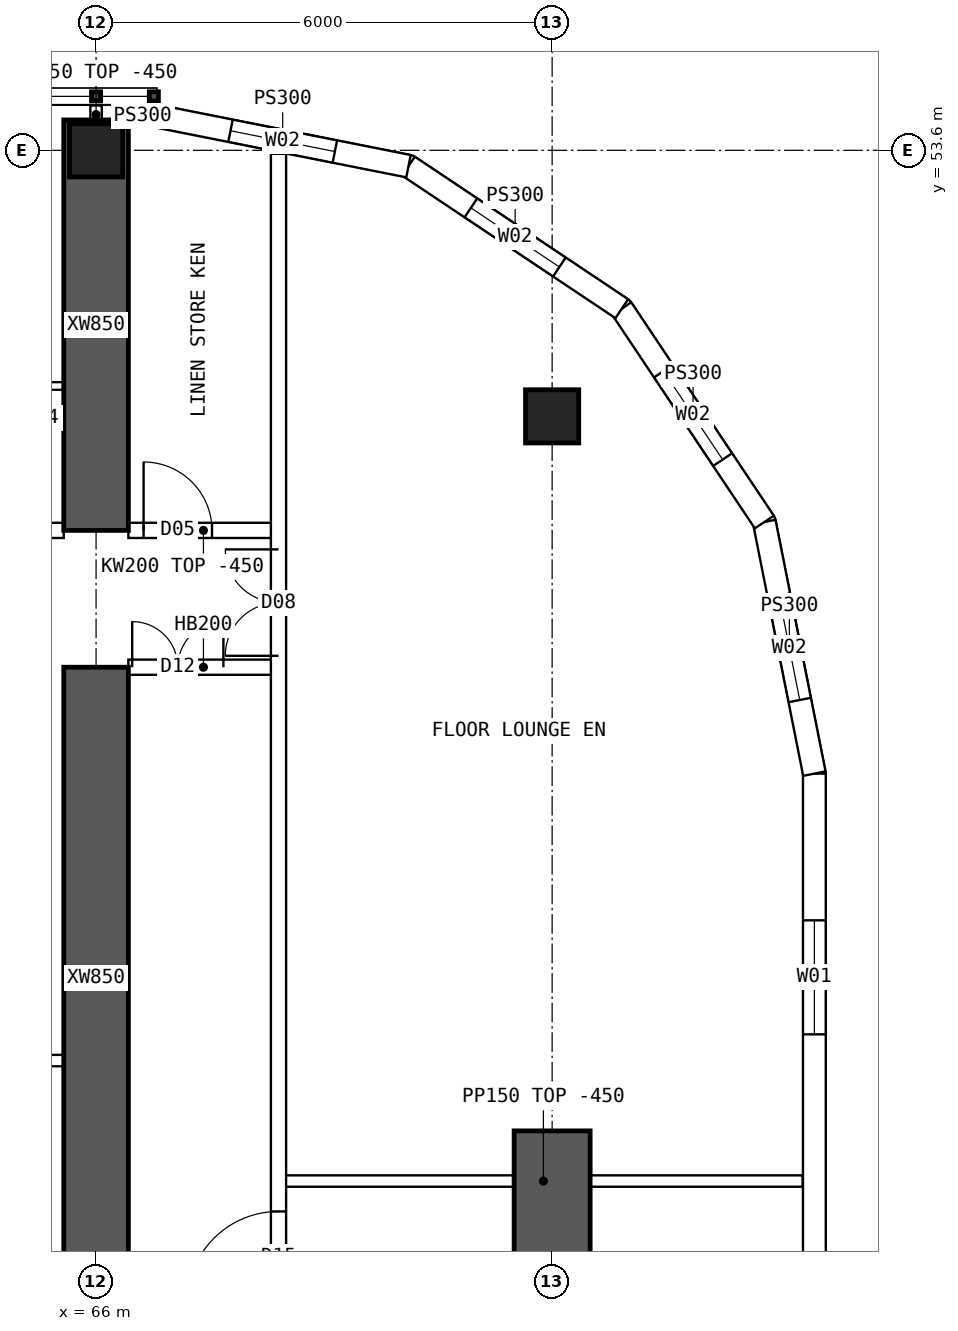
"""IFC4 building model, lengths in metres.
Left out: names, types, materials, properties, quantities, classifications, styles, units other than length and angle.
Written with IfcOpenShell. Run it as: python <this file> out.ifc"""

import sys

from ifc_helpers import new_model, si_unit, direction, frame, frame_2d, origin, origin_2d, place, context, subcontext, project, spatial, polyline, rectangle, hollow_rectangle, outline, extrude, element, fill, save


model = new_model("IFC4")
c1 = context("Model", 3, precision=1e-05, world=origin(), true_north=direction((0.0, 1.0)))
c2 = subcontext(c1, "Body", "Model", "MODEL_VIEW")
j1 = project(units=[si_unit("LENGTHUNIT", "METRE"), si_unit("PLANEANGLEUNIT", "RADIAN")], contexts=[c1])
p1 = place(None, origin())
s1 = spatial("IfcSite", under=j1, at=p1, CompositionType="ELEMENT")
p2 = place(p1, origin())
s2 = spatial("IfcBuilding", under=s1, at=p2, CompositionType="ELEMENT")
p3 = place(p2, frame((0.0, 0.0, 189.85)))
s3 = spatial("IfcBuildingStorey", under=s2, at=p3, CompositionType="ELEMENT", Elevation=189.85)
for number, where, z_axis, x_axis in (
    (1, (66.0, 53.6, 0.0), (0.0, 0.0, 1.0), (1.0, 0.0, 0.0)),
    (2, (72.0, 50.1, 0.0), (0.0, 0.0, 1.0), (1.0, 0.0, 0.0)),
):
    element("IfcColumn", number, at=place(p3, frame(where, z_axis=z_axis, x_axis=x_axis)), inside=s3, PredefinedType="COLUMN", context=c2, shape_type="SweptSolid", body=[
        extrude(hollow_rectangle(XDim=0.7, YDim=0.7, WallThickness=0.07, at=origin_2d()), origin(), (0.0, 0.0, 1.0), 3.75),
    ])
p4 = place(p3, frame((72.0, 35.7, 0.0), z_axis=(0.0, 0.0, 1.0), x_axis=(0.0, 1.0, 0.0)))
e3 = element("IfcWall", 3, at=p4, inside=s3, PredefinedType="SHEAR", context=c2, shape_type="SweptSolid", body=[
    extrude(rectangle(XDim=5.0, YDim=1.0, at=frame_2d((2.5, 0.0))), origin(), (0.0, 0.0, 1.0), 3.75),
])
p5 = place(p3, frame((66.0, 48.6, 0.0), z_axis=(0.0, 0.0, 1.0), x_axis=(0.0, 1.0, 0.0)))
e4 = element("IfcWall", 4, at=p5, inside=s3, PredefinedType="SHEAR", context=c2, shape_type="SweptSolid", body=[
    extrude(rectangle(XDim=5.4, YDim=0.85, at=frame_2d((2.7, 0.0))), origin(), (0.0, 0.0, 1.0), 3.75),
])
p6 = place(p3, frame((66.0, 38.625, 0.0), z_axis=(0.0, 0.0, 1.0), x_axis=(0.0, 1.0, 0.0)))
e5 = element("IfcWall", 5, at=p6, inside=s3, PredefinedType="SHEAR", context=c2, shape_type="SweptSolid", body=[
    extrude(rectangle(XDim=8.175, YDim=0.85, at=frame_2d((4.087, 0.0))), origin(), (0.0, 0.0, 1.0), 3.75),
])
p7 = place(p3, frame((75.45, 18.6, 0.0), z_axis=(0.0, 0.0, 1.0), x_axis=(0.0, 1.0, 0.0)))
e6 = element("IfcWall", 6, at=p7, inside=s3, PredefinedType="SOLIDWALL", context=c2, shape_type="SweptSolid", body=[
    extrude(outline(polyline([(-0.015, -0.15), (26.815, -0.15), (26.785, 0.15), (0.015, 0.15), (-0.015, -0.15)])), origin(), (0.0, 0.0, 1.0), 3.3),
])
p8 = place(p7, frame((1.93, 0.0, 0.9)))
e7 = element("IfcOpeningElement", 7, at=p8, cuts=e6, PredefinedType="OPENING", context=c2, shape_type="SweptSolid", body=[
    extrude(rectangle(XDim=1.5, YDim=2.0, at=frame_2d((0.75, 1.0))), frame((0.0, 0.16, 0.0), z_axis=(0.0, -1.0, 0.0), x_axis=(1.0, 0.0, 0.0)), (0.0, 0.0, 1.0), 0.32),
])
p9 = place(p7, frame((7.29, 0.0, 0.9)))
e8 = element("IfcOpeningElement", 8, at=p9, cuts=e6, PredefinedType="OPENING", context=c2, shape_type="SweptSolid", body=[
    extrude(rectangle(XDim=1.5, YDim=2.0, at=frame_2d((0.75, 1.0))), frame((0.0, 0.16, 0.0), z_axis=(0.0, -1.0, 0.0), x_axis=(1.0, 0.0, 0.0)), (0.0, 0.0, 1.0), 0.32),
])
p10 = place(p7, frame((12.65, 0.0, 0.9)))
e9 = element("IfcOpeningElement", 9, at=p10, cuts=e6, PredefinedType="OPENING", context=c2, shape_type="SweptSolid", body=[
    extrude(rectangle(XDim=1.5, YDim=2.0, at=frame_2d((0.75, 1.0))), frame((0.0, 0.16, 0.0), z_axis=(0.0, -1.0, 0.0), x_axis=(1.0, 0.0, 0.0)), (0.0, 0.0, 1.0), 0.32),
])
p11 = place(p7, frame((18.01, 0.0, 0.9)))
e10 = element("IfcOpeningElement", 10, at=p11, cuts=e6, PredefinedType="OPENING", context=c2, shape_type="SweptSolid", body=[
    extrude(rectangle(XDim=1.5, YDim=2.0, at=frame_2d((0.75, 1.0))), frame((0.0, 0.16, 0.0), z_axis=(0.0, -1.0, 0.0), x_axis=(1.0, 0.0, 0.0)), (0.0, 0.0, 1.0), 0.32),
])
p12 = place(p7, frame((23.37, 0.0, 0.9)))
e11 = element("IfcOpeningElement", 11, at=p12, cuts=e6, PredefinedType="OPENING", context=c2, shape_type="SweptSolid", body=[
    extrude(rectangle(XDim=1.5, YDim=2.0, at=frame_2d((0.75, 1.0))), frame((0.0, 0.16, 0.0), z_axis=(0.0, -1.0, 0.0), x_axis=(1.0, 0.0, 0.0)), (0.0, 0.0, 1.0), 0.32),
])
p13 = place(p3, frame((75.45, 45.4, 0.0), z_axis=(0.0, 0.0, 1.0), x_axis=(-0.19508664885, 0.980786011034, 0.0)))
e12 = element("IfcWall", 12, at=p13, inside=s3, PredefinedType="SOLIDWALL", context=c2, shape_type="SweptSolid", body=[
    extrude(outline(polyline([(-0.015, -0.15), (3.405, -0.15), (3.345, 0.15), (0.015, 0.15), (-0.015, -0.15)])), origin(), (0.0, 0.0, 1.0), 3.3),
])
p14 = place(p13, frame((0.988, 0.0, 0.9)))
e13 = element("IfcOpeningElement", 13, at=p14, cuts=e12, PredefinedType="OPENING", context=c2, shape_type="SweptSolid", body=[
    extrude(rectangle(XDim=1.4, YDim=1.8, at=frame_2d((0.7, 0.9))), frame((0.0, 0.16, 0.0), z_axis=(0.0, -1.0, 0.0), x_axis=(1.0, 0.0, 0.0)), (0.0, 0.0, 1.0), 0.32),
])
p15 = place(p3, frame((74.792, 48.71, 0.0), z_axis=(0.0, 0.0, 1.0), x_axis=(-0.555534554399, 0.831493450887, 0.0)))
e14 = element("IfcWall", 14, at=p15, inside=s3, PredefinedType="SOLIDWALL", context=c2, shape_type="SweptSolid", body=[
    extrude(outline(polyline([(-0.03, -0.15), (3.405, -0.15), (3.345, 0.15), (0.03, 0.15), (-0.03, -0.15)])), origin(), (0.0, 0.0, 1.0), 3.3),
])
p16 = place(p15, frame((0.988, 0.0, 0.9)))
e15 = element("IfcOpeningElement", 15, at=p16, cuts=e14, PredefinedType="OPENING", context=c2, shape_type="SweptSolid", body=[
    extrude(rectangle(XDim=1.4, YDim=1.8, at=frame_2d((0.7, 0.9))), frame((0.0, 0.16, 0.0), z_axis=(0.0, -1.0, 0.0), x_axis=(1.0, 0.0, 0.0)), (0.0, 0.0, 1.0), 0.32),
])
p17 = place(p3, frame((72.917, 51.517, 0.0), z_axis=(0.0, 0.0, 1.0), x_axis=(-0.831493450887, 0.555534554399, 0.0)))
e16 = element("IfcWall", 16, at=p17, inside=s3, PredefinedType="SOLIDWALL", context=c2, shape_type="SweptSolid", body=[
    extrude(outline(polyline([(-0.03, -0.15), (3.405, -0.15), (3.345, 0.15), (0.03, 0.15), (-0.03, -0.15)])), origin(), (0.0, 0.0, 1.0), 3.3),
])
p18 = place(p17, frame((0.988, 0.0, 0.9)))
e17 = element("IfcOpeningElement", 17, at=p18, cuts=e16, PredefinedType="OPENING", context=c2, shape_type="SweptSolid", body=[
    extrude(rectangle(XDim=1.4, YDim=1.8, at=frame_2d((0.7, 0.9))), frame((0.0, 0.16, 0.0), z_axis=(0.0, -1.0, 0.0), x_axis=(1.0, 0.0, 0.0)), (0.0, 0.0, 1.0), 0.32),
])
p19 = place(p3, frame((70.11, 53.392, 0.0), z_axis=(0.0, 0.0, 1.0), x_axis=(-0.98078325777, 0.195100490205, 0.0)))
e18 = element("IfcWall", 18, at=p19, inside=s3, PredefinedType="SOLIDWALL", context=c2, shape_type="SweptSolid", body=[
    extrude(outline(polyline([(-0.03, -0.15), (3.405, -0.15), (3.345, 0.15), (0.03, 0.15), (-0.03, -0.15)])), origin(), (0.0, 0.0, 1.0), 3.3),
])
p20 = place(p19, frame((0.988, 0.0, 0.9)))
e19 = element("IfcOpeningElement", 19, at=p20, cuts=e18, PredefinedType="OPENING", context=c2, shape_type="SweptSolid", body=[
    extrude(rectangle(XDim=1.4, YDim=1.8, at=frame_2d((0.7, 0.9))), frame((0.0, 0.16, 0.0), z_axis=(0.0, -1.0, 0.0), x_axis=(1.0, 0.0, 0.0)), (0.0, 0.0, 1.0), 0.32),
])
p21 = place(p3, frame((66.8, 54.05, 0.0), z_axis=(0.0, 0.0, 1.0), x_axis=(-1.0, 0.0, 0.0)))
e20 = element("IfcWall", 20, at=p21, inside=s3, PredefinedType="SOLIDWALL", context=c2, shape_type="SweptSolid", body=[
    extrude(rectangle(XDim=0.375, YDim=0.3, at=frame_2d((0.188, 0.0))), origin(), (0.0, 0.0, 1.0), 3.3),
])
p22 = place(p3, frame((60.425, 48.6, 0.0), z_axis=(0.0, 0.0, 1.0), x_axis=(1.0, 0.0, 0.0)))
e21 = element("IfcWall", 21, at=p22, inside=s3, PredefinedType="SOLIDWALL", context=c2, shape_type="SweptSolid", body=[
    extrude(outline(polyline([(0.0, 0.0), (5.15, 0.0), (5.15, 2.9), (0.0, 2.9), (0.0, 0.0)])), frame((0.0, 0.1, 0.0), z_axis=(0.0, -1.0, 0.0), x_axis=(1.0, 0.0, 0.0)), (0.0, 0.0, 1.0), 0.2),
])
p23 = place(p22, frame((0.1, 0.0, 0.0)))
e22 = element("IfcOpeningElement", 22, at=p23, cuts=e21, PredefinedType="OPENING", context=c2, shape_type="SweptSolid", body=[
    extrude(rectangle(XDim=0.9, YDim=2.1, at=frame_2d((0.45, 1.05))), frame((0.0, 0.11, 0.0), z_axis=(0.0, -1.0, 0.0), x_axis=(1.0, 0.0, 0.0)), (0.0, 0.0, 1.0), 0.22),
])
p24 = place(p3, frame((66.425, 48.6, 0.0), z_axis=(0.0, 0.0, 1.0), x_axis=(1.0, 0.0, 0.0)))
e23 = element("IfcWall", 23, at=p24, inside=s3, PredefinedType="SOLIDWALL", context=c2, shape_type="SweptSolid", body=[
    extrude(rectangle(XDim=1.975, YDim=0.2, at=frame_2d((0.987, 0.0))), origin(), (0.0, 0.0, 1.0), 3.3),
])
p25 = place(p24, frame((0.2, 0.0, 0.0)))
e24 = element("IfcOpeningElement", 24, at=p25, cuts=e23, PredefinedType="OPENING", context=c2, shape_type="SweptSolid", body=[
    extrude(rectangle(XDim=0.9, YDim=2.1, at=frame_2d((0.45, 1.05))), frame((0.0, 0.11, 0.0), z_axis=(0.0, -1.0, 0.0), x_axis=(1.0, 0.0, 0.0)), (0.0, 0.0, 1.0), 0.22),
])
p26 = place(p3, frame((66.425, 46.8, 0.0), z_axis=(0.0, 0.0, 1.0), x_axis=(1.0, 0.0, 0.0)))
e25 = element("IfcWall", 25, at=p26, inside=s3, PredefinedType="SOLIDWALL", context=c2, shape_type="SweptSolid", body=[
    extrude(rectangle(XDim=1.975, YDim=0.2, at=frame_2d((0.987, 0.0))), origin(), (0.0, 0.0, 1.0), 3.3),
])
p27 = place(p26, frame((0.05, 0.0, 0.0)))
e26 = element("IfcOpeningElement", 26, at=p27, cuts=e25, PredefinedType="OPENING", context=c2, shape_type="SweptSolid", body=[
    extrude(rectangle(XDim=1.2, YDim=2.1, at=frame_2d((0.6, 1.05))), frame((0.0, 0.11, 0.0), z_axis=(0.0, -1.0, 0.0), x_axis=(1.0, 0.0, 0.0)), (0.0, 0.0, 1.0), 0.22),
])
p28 = place(p3, frame((63.025, 50.5, 0.0), z_axis=(0.0, 0.0, 1.0), x_axis=(1.0, 0.0, 0.0)))
e27 = element("IfcWall", 27, at=p28, inside=s3, PredefinedType="PARTITIONING", context=c2, shape_type="SweptSolid", body=[
    extrude(rectangle(XDim=2.55, YDim=0.1, at=frame_2d((1.275, 0.0))), origin(), (0.0, 0.0, 1.0), 3.3),
])
p29 = place(p28, frame((0.825, 0.0, 0.0)))
e28 = element("IfcOpeningElement", 28, at=p29, cuts=e27, PredefinedType="OPENING", context=c2, shape_type="SweptSolid", body=[
    extrude(rectangle(XDim=0.9, YDim=2.1, at=frame_2d((0.45, 1.05))), frame((0.0, 0.06, 0.0), z_axis=(0.0, -1.0, 0.0), x_axis=(1.0, 0.0, 0.0)), (0.0, 0.0, 1.0), 0.12),
])
p30 = place(p3, frame((65.575, 41.625, 0.0), z_axis=(0.0, 0.0, 1.0), x_axis=(-1.0, 0.0, 0.0)))
e29 = element("IfcWall", 29, at=p30, inside=s3, PredefinedType="PARTITIONING", context=c2, shape_type="SweptSolid", body=[
    extrude(rectangle(XDim=5.5, YDim=0.15, at=frame_2d((2.75, 0.0))), origin(), (0.0, 0.0, 1.0), 3.3),
])
p31 = place(p30, frame((0.4, 0.0, 0.0)))
e30 = element("IfcOpeningElement", 30, at=p31, cuts=e29, PredefinedType="OPENING", context=c2, shape_type="SweptSolid", body=[
    extrude(rectangle(XDim=1.0, YDim=2.1, at=frame_2d((0.5, 1.05))), frame((0.0, 0.085, 0.0), z_axis=(0.0, -1.0, 0.0), x_axis=(1.0, 0.0, 0.0)), (0.0, 0.0, 1.0), 0.17),
])
p32 = place(p3, frame((68.4, 10.446, 0.0), z_axis=(0.0, 0.0, 1.0), x_axis=(0.0, 1.0, 0.0)))
e31 = element("IfcWall", 31, at=p32, inside=s3, PredefinedType="SOLIDWALL", context=c2, shape_type="SweptSolid", body=[
    extrude(rectangle(XDim=43.107, YDim=0.2, at=frame_2d((21.554, 0.0))), origin(), (0.0, 0.0, 1.0), 3.3),
])
p33 = place(p32, frame((27.994, 0.0, 0.0)))
e32 = element("IfcOpeningElement", 32, at=p33, cuts=e31, PredefinedType="OPENING", context=c2, shape_type="SweptSolid", body=[
    extrude(rectangle(XDim=1.2, YDim=2.1, at=frame_2d((0.6, 1.05))), frame((0.0, 0.11, 0.0), z_axis=(0.0, -1.0, 0.0), x_axis=(1.0, 0.0, 0.0)), (0.0, 0.0, 1.0), 0.22),
])
p34 = place(p32, frame((5.104, 0.0, 0.0)))
e33 = element("IfcOpeningElement", 33, at=p34, cuts=e31, PredefinedType="OPENING", context=c2, shape_type="SweptSolid", body=[
    extrude(rectangle(XDim=1.4, YDim=2.1, at=frame_2d((0.7, 1.05))), frame((0.0, 0.11, 0.0), z_axis=(0.0, -1.0, 0.0), x_axis=(1.0, 0.0, 0.0)), (0.0, 0.0, 1.0), 0.22),
])
p35 = place(p32, frame((36.504, 0.0, 0.0)))
e34 = element("IfcOpeningElement", 34, at=p35, cuts=e31, PredefinedType="OPENING", context=c2, shape_type="SweptSolid", body=[
    extrude(rectangle(XDim=1.4, YDim=2.1, at=frame_2d((0.7, 1.05))), frame((0.0, 0.11, 0.0), z_axis=(0.0, -1.0, 0.0), x_axis=(1.0, 0.0, 0.0)), (0.0, 0.0, 1.0), 0.22),
])
p36 = place(p3, frame((68.475, 40.04, 0.0), z_axis=(0.0, 0.0, 1.0), x_axis=(1.0, 0.0, 0.0)))
e35 = element("IfcWall", 35, at=p36, inside=s3, PredefinedType="PARTITIONING", context=c2, shape_type="SweptSolid", body=[
    extrude(rectangle(XDim=6.82, YDim=0.15, at=frame_2d((3.41, 0.0))), origin(), (0.0, 0.0, 1.0), 3.3),
])
p37 = place(p3, frame((66.0, 53.95, 0.0), z_axis=(0.0, 0.0, 1.0), x_axis=(0.0, 1.0, 0.0)))
e36 = element("IfcWall", 36, at=p37, inside=s3, PredefinedType="PARTITIONING", context=c2, shape_type="SweptSolid", body=[
    extrude(rectangle(XDim=0.24, YDim=0.15, at=frame_2d((0.12, 0.0))), origin(), (0.0, 0.0, 1.0), 3.3),
])
p38 = place(p12, origin())
e37 = element("IfcWindow", 37, at=p38, inside=s3, PartitioningType="SINGLE_PANEL", PredefinedType="WINDOW", context=c2, shape_type="SweptSolid", body=[
    extrude(rectangle(XDim=1.5, YDim=2.0, at=frame_2d((0.75, 1.0))), frame((0.0, 0.03, 0.0), z_axis=(0.0, -1.0, 0.0), x_axis=(1.0, 0.0, 0.0)), (0.0, 0.0, 1.0), 0.06),
])
fill(e11, e37)
p39 = place(p14, origin())
e38 = element("IfcWindow", 38, at=p39, inside=s3, PartitioningType="SINGLE_PANEL", PredefinedType="WINDOW", context=c2, shape_type="SweptSolid", body=[
    extrude(rectangle(XDim=1.4, YDim=1.8, at=frame_2d((0.7, 0.9))), frame((0.0, 0.03, 0.0), z_axis=(0.0, -1.0, 0.0), x_axis=(1.0, 0.0, 0.0)), (0.0, 0.0, 1.0), 0.06),
])
fill(e13, e38)
p40 = place(p16, origin())
e39 = element("IfcWindow", 39, at=p40, inside=s3, PartitioningType="SINGLE_PANEL", PredefinedType="WINDOW", context=c2, shape_type="SweptSolid", body=[
    extrude(rectangle(XDim=1.4, YDim=1.8, at=frame_2d((0.7, 0.9))), frame((0.0, 0.03, 0.0), z_axis=(0.0, -1.0, 0.0), x_axis=(1.0, 0.0, 0.0)), (0.0, 0.0, 1.0), 0.06),
])
fill(e15, e39)
p41 = place(p18, origin())
e40 = element("IfcWindow", 40, at=p41, inside=s3, PartitioningType="SINGLE_PANEL", PredefinedType="WINDOW", context=c2, shape_type="SweptSolid", body=[
    extrude(rectangle(XDim=1.4, YDim=1.8, at=frame_2d((0.7, 0.9))), frame((0.0, 0.03, 0.0), z_axis=(0.0, -1.0, 0.0), x_axis=(1.0, 0.0, 0.0)), (0.0, 0.0, 1.0), 0.06),
])
fill(e17, e40)
p42 = place(p20, origin())
e41 = element("IfcWindow", 41, at=p42, inside=s3, PartitioningType="SINGLE_PANEL", PredefinedType="WINDOW", context=c2, shape_type="SweptSolid", body=[
    extrude(rectangle(XDim=1.4, YDim=1.8, at=frame_2d((0.7, 0.9))), frame((0.0, 0.03, 0.0), z_axis=(0.0, -1.0, 0.0), x_axis=(1.0, 0.0, 0.0)), (0.0, 0.0, 1.0), 0.06),
])
fill(e19, e41)
p43 = place(p27, origin())
e42 = element("IfcDoor", 42, at=p43, inside=s3, OperationType="DOUBLE_DOOR_SINGLE_SWING", PredefinedType="DOOR", context=c2, shape_type="SweptSolid", body=[
    extrude(rectangle(XDim=1.2, YDim=2.1, at=frame_2d((0.6, 1.05))), frame((0.0, 0.025, 0.0), z_axis=(0.0, -1.0, 0.0), x_axis=(1.0, 0.0, 0.0)), (0.0, 0.0, 1.0), 0.05),
])
fill(e26, e42)
p44 = place(p33, origin())
e43 = element("IfcDoor", 43, at=p44, inside=s3, OperationType="SINGLE_SWING_LEFT", PredefinedType="DOOR", context=c2, shape_type="SweptSolid", body=[
    extrude(rectangle(XDim=1.2, YDim=2.1, at=frame_2d((0.6, 1.05))), frame((0.0, 0.025, 0.0), z_axis=(0.0, -1.0, 0.0), x_axis=(1.0, 0.0, 0.0)), (0.0, 0.0, 1.0), 0.05),
])
fill(e32, e43)
p45 = place(p35, origin())
e44 = element("IfcDoor", 44, at=p45, inside=s3, OperationType="DOUBLE_DOOR_SINGLE_SWING", PredefinedType="DOOR", context=c2, shape_type="SweptSolid", body=[
    extrude(rectangle(XDim=1.4, YDim=2.1, at=frame_2d((0.7, 1.05))), frame((0.0, 0.025, 0.0), z_axis=(0.0, -1.0, 0.0), x_axis=(1.0, 0.0, 0.0)), (0.0, 0.0, 1.0), 0.05),
])
fill(e34, e44)
p46 = place(p25, origin())
e45 = element("IfcDoor", 45, at=p46, inside=s3, OperationType="SINGLE_SWING_LEFT", PredefinedType="DOOR", context=c2, shape_type="SweptSolid", body=[
    extrude(rectangle(XDim=0.9, YDim=2.1, at=frame_2d((0.45, 1.05))), frame((0.0, 0.025, 0.0), z_axis=(0.0, -1.0, 0.0), x_axis=(1.0, 0.0, 0.0)), (0.0, 0.0, 1.0), 0.05),
])
fill(e24, e45)
save(model, sys.argv[1])
